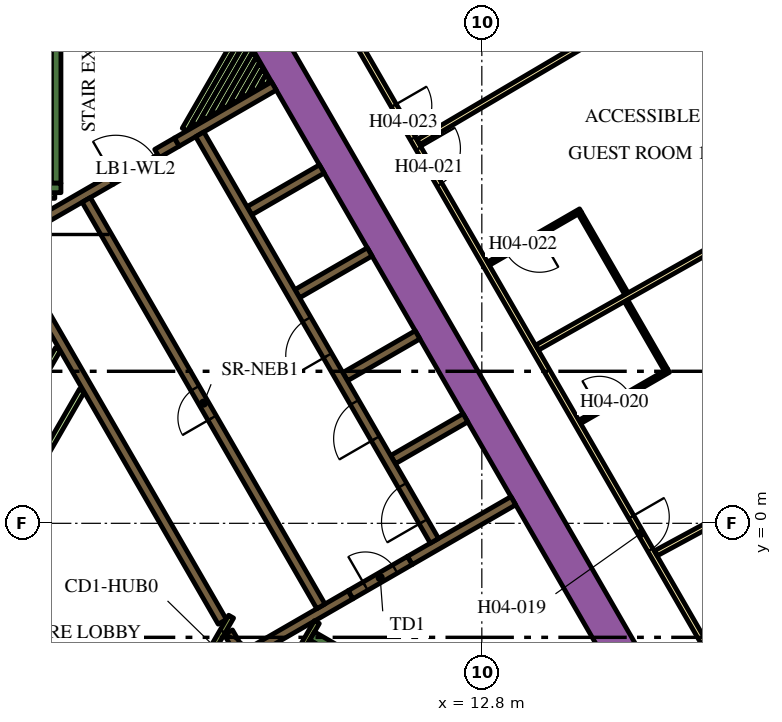
"""IFC4 building model, lengths in metres.
Left out: names, types, materials, properties, quantities, classifications, styles, units other than length and angle.
Written with IfcOpenShell. Run it as: python <this file> out.ifc"""

import sys

from ifc_helpers import new_model, si_unit, direction, frame, frame_2d, origin, place, context, subcontext, project, spatial, rectangle, extrude, element, fill, save


model = new_model("IFC4")
c1 = context("Model", 3, precision=1e-05, world=origin(), true_north=direction((0.0, 1.0)))
c2 = subcontext(c1, "Body", "Model", "MODEL_VIEW")
j1 = project(units=[si_unit("LENGTHUNIT", "METRE"), si_unit("PLANEANGLEUNIT", "RADIAN")], contexts=[c1])
p1 = place(None, origin())
s1 = spatial("IfcSite", under=j1, at=p1, CompositionType="ELEMENT")
p2 = place(p1, origin())
s2 = spatial("IfcBuilding", under=s1, at=p2, CompositionType="ELEMENT")
p3 = place(p2, frame((0.0, 0.0, 66.6)))
s3 = spatial("IfcBuildingStorey", under=s2, at=p3, CompositionType="ELEMENT", Elevation=66.6)
p4 = place(p3, frame((6.461, 13.909, 0.0), z_axis=(0.0, 0.0, 1.0), x_axis=(0.500005804227, -0.866022052686, 0.0)))
e1 = element("IfcWall", 1, at=p4, inside=s3, PredefinedType="SOLIDWALL", context=c2, shape_type="SweptSolid", body=[
    extrude(rectangle(XDim=20.834, YDim=0.9, at=frame_2d((10.417, 0.0))), origin(), (0.0, 0.0, 1.0), 3.9),
])
p5 = place(p3, frame((8.334, -2.964, 0.0), z_axis=(0.0, 0.0, 1.0), x_axis=(0.866016039709, -0.500016218704, 0.0)))
e2 = element("IfcWall", 2, at=p5, inside=s3, PredefinedType="SOLIDWALL", context=c2, shape_type="SweptSolid", body=[
    extrude(rectangle(XDim=7.05, YDim=0.25, at=frame_2d((3.525, 0.0))), origin(), (0.0, 0.0, 1.0), 3.9),
])
p6 = place(p3, frame((8.168, -3.503, 0.0), z_axis=(0.0, 0.0, 1.0), x_axis=(0.49972245349, 0.866185586049, 0.0)))
e3 = element("IfcWall", 3, at=p6, inside=s3, PredefinedType="SOLIDWALL", context=c2, shape_type="SweptSolid", body=[
    extrude(rectangle(XDim=0.425, YDim=0.25, at=frame_2d((0.212, 0.0))), origin(), (0.0, 0.0, 1.0), 3.9),
])
p7 = place(p3, frame((1.6, 8.95, 0.0), z_axis=(0.0, 0.0, 1.0), x_axis=(0.0, 1.0, 0.0)))
e4 = element("IfcWall", 4, at=p7, inside=s3, PredefinedType="SOLIDWALL", context=c2, shape_type="SweptSolid", body=[
    extrude(rectangle(XDim=6.8, YDim=0.25, at=frame_2d((3.4, 0.0))), origin(), (0.0, 0.0, 1.0), 3.9),
])
p8 = place(p3, frame((1.05, 8.825, 0.0), z_axis=(0.0, 0.0, 1.0), x_axis=(1.0, 0.0, 0.0)))
e5 = element("IfcWall", 5, at=p8, inside=s3, PredefinedType="SOLIDWALL", context=c2, shape_type="SweptSolid", body=[
    extrude(rectangle(XDim=0.675, YDim=0.25, at=frame_2d((0.337, 0.0))), origin(), (0.0, 0.0, 1.0), 3.9),
])
p9 = place(p3, frame((10.464, 1.677, 0.0), z_axis=(0.0, 0.0, 1.0), x_axis=(0.86605622881, 0.499946605688, 0.0)))
e6 = element("IfcWall", 6, at=p9, inside=s3, PredefinedType="SOLIDWALL", context=c2, shape_type="SweptSolid", body=[
    extrude(rectangle(XDim=2.2, YDim=0.25, at=frame_2d((1.1, 0.0))), origin(), (0.0, 0.0, 1.0), 3.9),
])
p10 = place(p3, frame((13.629, 0.594, 0.0), z_axis=(0.0, 0.0, 1.0), x_axis=(-0.86602790099, -0.499995674689, 0.0)))
e7 = element("IfcWall", 7, at=p10, inside=s3, PredefinedType="SOLIDWALL", context=c2, shape_type="SweptSolid", body=[
    extrude(rectangle(XDim=3.146, YDim=0.25, at=frame_2d((1.573, 0.0))), origin(), (0.0, 0.0, 1.0), 3.9),
])
p11 = place(p3, frame((9.346, -1.879, 0.0), z_axis=(0.0, 0.0, 1.0), x_axis=(-0.866048528039, -0.499959945477, 0.0)))
e8 = element("IfcWall", 8, at=p11, inside=s3, PredefinedType="SOLIDWALL", context=c2, shape_type="SweptSolid", body=[
    extrude(rectangle(XDim=3.47, YDim=0.25, at=frame_2d((1.735, 0.0))), origin(), (0.0, 0.0, 1.0), 3.9),
])
p12 = place(p3, frame((6.13, -2.867, 0.0), z_axis=(0.0, 0.0, 1.0), x_axis=(0.500160776593, -0.865932559475, 0.0)))
e9 = element("IfcWall", 9, at=p12, inside=s3, PredefinedType="SOLIDWALL", context=c2, shape_type="SweptSolid", body=[
    extrude(rectangle(XDim=0.627, YDim=0.25, at=frame_2d((0.313, 0.0))), origin(), (0.0, 0.0, 1.0), 3.9),
])
for number, where, z_axis, x_axis in (
    (10, (9.204, 3.859, 0.0), (0.0, 0.0, 1.0), (0.866, 0.5, 0.0)),
    (11, (7.944, 6.041, 0.0), (0.0, 0.0, 1.0), (0.866, 0.5, 0.0)),
    (12, (6.684, 8.224, 0.0), (0.0, 0.0, 1.0), (0.866, 0.5, 0.0)),
):
    element("IfcWall", number, at=place(p3, frame(where, z_axis=z_axis, x_axis=x_axis)), inside=s3, PredefinedType="SOLIDWALL", context=c2, shape_type="SweptSolid", body=[
        extrude(rectangle(XDim=2.2, YDim=0.25, at=frame_2d((1.1, 0.0))), origin(), (0.0, 0.0, 1.0), 3.9),
    ])
p13 = place(p3, frame((4.254, 9.731, 0.0), z_axis=(0.0, 0.0, 1.0), x_axis=(0.866056883327, 0.499945471869, 0.0)))
e13 = element("IfcWall", 13, at=p13, inside=s3, PredefinedType="SOLIDWALL", context=c2, shape_type="SweptSolid", body=[
    extrude(rectangle(XDim=0.6, YDim=0.25, at=frame_2d((0.3, 0.0))), origin(), (0.0, 0.0, 1.0), 3.9),
])
p14 = place(p3, frame((4.776, 10.032, 0.0), z_axis=(0.0, 0.0, 1.0), x_axis=(0.86600215702, 0.500040262416, 0.0)))
e14 = element("IfcWall", 14, at=p14, inside=s3, PredefinedType="SOLIDWALL", context=c2, shape_type="SweptSolid", body=[
    extrude(rectangle(XDim=2.948, YDim=0.25, at=frame_2d((1.474, 0.0))), origin(), (0.0, 0.0, 1.0), 3.9),
])
p15 = place(p3, frame((0.098, 7.331, 0.0), z_axis=(0.0, 0.0, 1.0), x_axis=(0.865988154826, 0.50006451154, 0.0)))
e15 = element("IfcWall", 15, at=p15, inside=s3, PredefinedType="SOLIDWALL", context=c2, shape_type="SweptSolid", body=[
    extrude(rectangle(XDim=3.398, YDim=0.25, at=frame_2d((1.699, 0.0))), origin(), (0.0, 0.0, 1.0), 3.9),
])
p16 = place(p3, frame((5.97, -2.591, 0.0), z_axis=(0.0, 0.0, 1.0), x_axis=(-0.499994469932, 0.866028596547, 0.0)))
e16 = element("IfcWall", 16, at=p16, inside=s3, PredefinedType="SOLIDWALL", context=c2, shape_type="SweptSolid", body=[
    extrude(rectangle(XDim=10.488, YDim=0.25, at=frame_2d((5.244, 0.0))), origin(), (0.0, 0.0, 1.0), 3.9),
])
p17 = place(p3, frame((8.459, -2.599, 0.0), z_axis=(0.0, 0.0, 1.0), x_axis=(-0.500041054325, -0.866001699761, 0.0)))
e17 = element("IfcWall", 17, at=p17, inside=s3, PredefinedType="PARTITIONING", context=c2, shape_type="SweptSolid", body=[
    extrude(rectangle(XDim=0.929, YDim=0.15, at=frame_2d((0.464, 0.0))), origin(), (0.0, 0.0, 1.0), 3.9),
])
p18 = place(p3, frame((-1.887, -3.718, 0.0), z_axis=(0.0, 0.0, 1.0), x_axis=(0.500005008002, 0.866022512394, 0.0)))
e18 = element("IfcWall", 18, at=p18, inside=s3, PredefinedType="PARTITIONING", context=c2, shape_type="SweptSolid", body=[
    extrude(rectangle(XDim=8.327, YDim=0.15, at=frame_2d((4.164, 0.0))), origin(), (0.0, 0.0, 1.0), 2.75),
])
p19 = place(p3, frame((-0.3, 1.212, 0.0), z_axis=(0.0, 0.0, 1.0), x_axis=(0.499963101113, 0.866046706318, 0.0)))
e19 = element("IfcWall", 19, at=p19, inside=s3, PredefinedType="PARTITIONING", context=c2, shape_type="SweptSolid", body=[
    extrude(rectangle(XDim=3.893, YDim=0.15, at=frame_2d((1.947, 0.0))), origin(), (0.0, 0.0, 1.0), 2.75),
])
p20 = place(p3, frame((1.05, 8.625, 0.0), z_axis=(0.0, 0.0, 1.0), x_axis=(1.0, 0.0, 0.0)))
e20 = element("IfcWall", 20, at=p20, inside=s3, PredefinedType="PARTITIONING", context=c2, shape_type="SweptSolid", body=[
    extrude(rectangle(XDim=0.514, YDim=0.15, at=frame_2d((0.257, 0.0))), origin(), (0.0, 0.0, 1.0), 2.75),
])
p21 = place(p3, frame((4.982, 10.359, 0.0), z_axis=(0.0, 0.0, 1.0), x_axis=(0.500051824031, 0.865995481099, 0.0)))
e21 = element("IfcWall", 21, at=p21, inside=s3, PredefinedType="PARTITIONING", context=c2, shape_type="SweptSolid", body=[
    extrude(rectangle(XDim=2.973, YDim=0.15, at=frame_2d((1.486, 0.0))), origin(), (0.0, 0.0, 1.0), 2.75),
])
p22 = place(p3, frame((5.242, 10.509, 0.0), z_axis=(0.0, 0.0, 1.0), x_axis=(0.499958506883, 0.866049358521, 0.0)))
e22 = element("IfcWall", 22, at=p22, inside=s3, PredefinedType="PARTITIONING", context=c2, shape_type="SweptSolid", body=[
    extrude(rectangle(XDim=2.626, YDim=0.15, at=frame_2d((1.313, 0.0))), origin(), (0.0, 0.0, 1.0), 2.75),
])
p23 = place(p3, frame((5.501, 10.659, 0.0), z_axis=(0.0, 0.0, 1.0), x_axis=(0.499951092774, 0.866053638543, 0.0)))
e23 = element("IfcWall", 23, at=p23, inside=s3, PredefinedType="PARTITIONING", context=c2, shape_type="SweptSolid", body=[
    extrude(rectangle(XDim=2.28, YDim=0.15, at=frame_2d((1.14, 0.0))), origin(), (0.0, 0.0, 1.0), 2.75),
])
p24 = place(p3, frame((5.761, 10.809, 0.0), z_axis=(0.0, 0.0, 1.0), x_axis=(0.499900985997, 0.866082561999, 0.0)))
e24 = element("IfcWall", 24, at=p24, inside=s3, PredefinedType="PARTITIONING", context=c2, shape_type="SweptSolid", body=[
    extrude(rectangle(XDim=1.934, YDim=0.15, at=frame_2d((0.967, 0.0))), origin(), (0.0, 0.0, 1.0), 2.75),
])
p25 = place(p3, frame((6.021, 10.959, 0.0), z_axis=(0.0, 0.0, 1.0), x_axis=(0.499944387978, 0.86605750902, 0.0)))
e25 = element("IfcWall", 25, at=p25, inside=s3, PredefinedType="PARTITIONING", context=c2, shape_type="SweptSolid", body=[
    extrude(rectangle(XDim=1.587, YDim=0.15, at=frame_2d((0.793, 0.0))), origin(), (0.0, 0.0, 1.0), 2.75),
])
p26 = place(p3, frame((6.281, 11.109, 0.0), z_axis=(0.0, 0.0, 1.0), x_axis=(0.500012022864, 0.866018462269, 0.0)))
e26 = element("IfcWall", 26, at=p26, inside=s3, PredefinedType="PARTITIONING", context=c2, shape_type="SweptSolid", body=[
    extrude(rectangle(XDim=1.241, YDim=0.15, at=frame_2d((0.62, 0.0))), origin(), (0.0, 0.0, 1.0), 2.75),
])
p27 = place(p3, frame((6.541, 11.259, 0.0), z_axis=(0.0, 0.0, 1.0), x_axis=(0.500132045864, 0.865949153646, 0.0)))
e27 = element("IfcWall", 27, at=p27, inside=s3, PredefinedType="PARTITIONING", context=c2, shape_type="SweptSolid", body=[
    extrude(rectangle(XDim=0.894, YDim=0.15, at=frame_2d((0.447, 0.0))), origin(), (0.0, 0.0, 1.0), 2.75),
])
p28 = place(p3, frame((6.8, 11.409, 0.0), z_axis=(0.0, 0.0, 1.0), x_axis=(0.500210807569, 0.865903659763, 0.0)))
e28 = element("IfcWall", 28, at=p28, inside=s3, PredefinedType="PARTITIONING", context=c2, shape_type="SweptSolid", body=[
    extrude(rectangle(XDim=0.548, YDim=0.15, at=frame_2d((0.274, 0.0))), origin(), (0.0, 0.0, 1.0), 2.75),
])
p29 = place(p3, frame((7.06, 11.559, 0.0), z_axis=(0.0, 0.0, 1.0), x_axis=(0.499267785915, 0.866447735266, 0.0)))
e29 = element("IfcWall", 29, at=p29, inside=s3, PredefinedType="PARTITIONING", context=c2, shape_type="SweptSolid", body=[
    extrude(rectangle(XDim=0.201, YDim=0.15, at=frame_2d((0.101, 0.0))), origin(), (0.0, 0.0, 1.0), 2.75),
])
p30 = place(p3, frame((11.553, -0.46, 0.0), z_axis=(0.0, 0.0, 1.0), x_axis=(-0.500006514828, 0.866021642414, 0.0)))
e30 = element("IfcWall", 30, at=p30, inside=s3, PredefinedType="SOLIDWALL", context=c2, shape_type="SweptSolid", body=[
    extrude(rectangle(XDim=12.35, YDim=0.25, at=frame_2d((6.175, 0.0))), origin(), (0.0, 0.0, 1.0), 3.9),
])
p31 = place(p30, frame((0.585, 0.0, 0.0)))
e31 = element("IfcOpeningElement", 31, at=p31, cuts=e30, PredefinedType="OPENING", context=c2, shape_type="SweptSolid", body=[
    extrude(rectangle(XDim=1.1, YDim=2.1, at=frame_2d((0.55, 1.05))), frame((0.0, 0.135, 0.0), z_axis=(0.0, -1.0, 0.0), x_axis=(1.0, 0.0, 0.0)), (0.0, 0.0, 1.0), 0.27),
])
p32 = place(p30, frame((3.105, 0.0, 0.0)))
e32 = element("IfcOpeningElement", 32, at=p32, cuts=e30, PredefinedType="OPENING", context=c2, shape_type="SweptSolid", body=[
    extrude(rectangle(XDim=1.1, YDim=2.1, at=frame_2d((0.55, 1.05))), frame((0.0, 0.135, 0.0), z_axis=(0.0, -1.0, 0.0), x_axis=(1.0, 0.0, 0.0)), (0.0, 0.0, 1.0), 0.27),
])
p33 = place(p30, frame((5.625, 0.0, 0.0)))
e33 = element("IfcOpeningElement", 33, at=p33, cuts=e30, PredefinedType="OPENING", context=c2, shape_type="SweptSolid", body=[
    extrude(rectangle(XDim=1.1, YDim=2.1, at=frame_2d((0.55, 1.05))), frame((0.0, 0.135, 0.0), z_axis=(0.0, -1.0, 0.0), x_axis=(1.0, 0.0, 0.0)), (0.0, 0.0, 1.0), 0.27),
])
p34 = place(p3, frame((8.565, -2.185, 0.0), z_axis=(0.0, 0.0, 1.0), x_axis=(-0.499997954832, 0.866026584559, 0.0)))
e34 = element("IfcWall", 34, at=p34, inside=s3, PredefinedType="SOLIDWALL", context=c2, shape_type="SweptSolid", body=[
    extrude(rectangle(XDim=12.35, YDim=0.25, at=frame_2d((6.175, 0.0))), origin(), (0.0, 0.0, 1.0), 3.9),
])
p35 = place(p34, frame((5.725, 0.0, 0.0)))
e35 = element("IfcOpeningElement", 35, at=p35, cuts=e34, PredefinedType="OPENING", context=c2, shape_type="SweptSolid", body=[
    extrude(rectangle(XDim=0.9, YDim=2.1, at=frame_2d((0.45, 1.05))), frame((0.0, 0.135, 0.0), z_axis=(0.0, -1.0, 0.0), x_axis=(1.0, 0.0, 0.0)), (0.0, 0.0, 1.0), 0.27),
])
p36 = place(p3, frame((9.346, -1.879, 0.0), z_axis=(0.0, 0.0, 1.0), x_axis=(0.866047807691, 0.499961193289, 0.0)))
e36 = element("IfcWall", 36, at=p36, inside=s3, PredefinedType="SOLIDWALL", context=c2, shape_type="SweptSolid", body=[
    extrude(rectangle(XDim=1.8, YDim=0.25, at=frame_2d((0.9, 0.0))), origin(), (0.0, 0.0, 1.0), 3.9),
])
p37 = place(p36, frame((0.45, 0.0, 0.0)))
e37 = element("IfcOpeningElement", 37, at=p37, cuts=e36, PredefinedType="OPENING", context=c2, shape_type="SweptSolid", body=[
    extrude(rectangle(XDim=0.9, YDim=2.1, at=frame_2d((0.45, 1.05))), frame((0.0, 0.135, 0.0), z_axis=(0.0, -1.0, 0.0), x_axis=(1.0, 0.0, 0.0)), (0.0, 0.0, 1.0), 0.27),
])
p38 = place(p3, frame((6.203, -2.456, 0.0), z_axis=(0.0, 0.0, 1.0), x_axis=(-0.500043961785, -0.866000020948, 0.0)))
e38 = element("IfcWall", 38, at=p38, inside=s3, PredefinedType="PARTITIONING", context=c2, shape_type="SweptSolid", body=[
    extrude(rectangle(XDim=1.95, YDim=0.15, at=frame_2d((0.975, 0.0))), origin(), (0.0, 0.0, 1.0), 3.9),
])
p39 = place(p38, frame((0.45, 0.0, 0.0)))
e39 = element("IfcOpeningElement", 39, at=p39, cuts=e38, PredefinedType="OPENING", context=c2, shape_type="SweptSolid", body=[
    extrude(rectangle(XDim=0.9, YDim=2.1, at=frame_2d((0.45, 1.05))), frame((0.0, 0.085, 0.0), z_axis=(0.0, -1.0, 0.0), x_axis=(1.0, 0.0, 0.0)), (0.0, 0.0, 1.0), 0.17),
])
p40 = place(p3, frame((3.081, 8.961, 0.0), z_axis=(0.0, 0.0, 1.0), x_axis=(0.866034573852, 0.49998411664, 0.0)))
e40 = element("IfcWall", 40, at=p40, inside=s3, PredefinedType="PARTITIONING", context=c2, shape_type="SweptSolid", body=[
    extrude(rectangle(XDim=1.4, YDim=0.09, at=frame_2d((0.7, 0.0))), origin(), (0.0, 0.0, 1.0), 2.75),
])
p41 = place(p40, frame((0.1, 0.0, 0.0)))
e41 = element("IfcOpeningElement", 41, at=p41, cuts=e40, PredefinedType="OPENING", context=c2, shape_type="SweptSolid", body=[
    extrude(rectangle(XDim=1.2, YDim=2.1, at=frame_2d((0.6, 1.05))), frame((0.0, 0.055, 0.0), z_axis=(0.0, -1.0, 0.0), x_axis=(1.0, 0.0, 0.0)), (0.0, 0.0, 1.0), 0.11),
])
p42 = place(p3, frame((6.163, 18.475, 0.0), z_axis=(0.0, 0.0, 1.0), x_axis=(0.500001317485, -0.866024643133, 0.0)))
e42 = element("IfcWall", 42, at=p42, inside=s3, PredefinedType="PARTITIONING", context=c2, shape_type="SweptSolid", body=[
    extrude(rectangle(XDim=25.767, YDim=0.15, at=frame_2d((12.883, 0.0))), origin(), (0.0, 0.0, 1.0), 2.75),
])
p43 = place(p42, frame((21.138, 0.0, 0.0)))
e43 = element("IfcOpeningElement", 43, at=p43, cuts=e42, PredefinedType="OPENING", context=c2, shape_type="SweptSolid", body=[
    extrude(rectangle(XDim=1.0, YDim=2.1, at=frame_2d((0.5, 1.05))), frame((0.0, 0.085, 0.0), z_axis=(0.0, -1.0, 0.0), x_axis=(1.0, 0.0, 0.0)), (0.0, 0.0, 1.0), 0.17),
])
p44 = place(p42, frame((9.948, 0.0, 0.0)))
e44 = element("IfcOpeningElement", 44, at=p44, cuts=e42, PredefinedType="OPENING", context=c2, shape_type="SweptSolid", body=[
    extrude(rectangle(XDim=1.1, YDim=2.1, at=frame_2d((0.55, 1.05))), frame((0.0, 0.085, 0.0), z_axis=(0.0, -1.0, 0.0), x_axis=(1.0, 0.0, 0.0)), (0.0, 0.0, 1.0), 0.17),
])
p45 = place(p42, frame((8.641, 0.0, 0.0)))
e45 = element("IfcOpeningElement", 45, at=p45, cuts=e42, PredefinedType="OPENING", context=c2, shape_type="SweptSolid", body=[
    extrude(rectangle(XDim=1.0, YDim=2.1, at=frame_2d((0.5, 1.05))), frame((0.0, 0.085, 0.0), z_axis=(0.0, -1.0, 0.0), x_axis=(1.0, 0.0, 0.0)), (0.0, 0.0, 1.0), 0.17),
])
p46 = place(p42, frame((0.18, 0.0, 0.0)))
e46 = element("IfcOpeningElement", 46, at=p46, cuts=e42, PredefinedType="OPENING", context=c2, shape_type="SweptSolid", body=[
    extrude(rectangle(XDim=1.0, YDim=2.1, at=frame_2d((0.5, 1.05))), frame((0.0, 0.085, 0.0), z_axis=(0.0, -1.0, 0.0), x_axis=(1.0, 0.0, 0.0)), (0.0, 0.0, 1.0), 0.17),
])
p47 = place(p3, frame((17.856, 13.999, 0.0), z_axis=(0.0, 0.0, 1.0), x_axis=(-0.861371519381, -0.507975497047, 0.0)))
e47 = element("IfcWall", 47, at=p47, inside=s3, PredefinedType="PARTITIONING", context=c2, shape_type="SweptSolid", body=[
    extrude(rectangle(XDim=7.804, YDim=0.15, at=frame_2d((3.902, 0.0))), origin(), (0.0, 0.0, 1.0), 2.75),
])
p48 = place(p3, frame((21.052, 8.464, 0.0), z_axis=(0.0, 0.0, 1.0), x_axis=(-0.87059371954, -0.492002617368, 0.0)))
e48 = element("IfcWall", 48, at=p48, inside=s3, PredefinedType="PARTITIONING", context=c2, shape_type="SweptSolid", body=[
    extrude(rectangle(XDim=7.803, YDim=0.15, at=frame_2d((3.902, 0.0))), origin(), (0.0, 0.0, 1.0), 2.75),
])
p49 = place(p3, frame((24.145, 2.871, 0.0), z_axis=(0.0, 0.0, 1.0), x_axis=(-0.879551725039, -0.475803281809, 0.0)))
e49 = element("IfcWall", 49, at=p49, inside=s3, PredefinedType="PARTITIONING", context=c2, shape_type="SweptSolid", body=[
    extrude(rectangle(XDim=7.688, YDim=0.15, at=frame_2d((3.844, 0.0))), origin(), (0.0, 0.0, 1.0), 2.75),
])
p50 = place(p3, frame((15.376, 2.668, 0.0), z_axis=(0.0, 0.0, 1.0), x_axis=(0.866036505625, 0.499980770555, 0.0)))
e50 = element("IfcWall", 50, at=p50, inside=s3, PredefinedType="PARTITIONING", context=c2, shape_type="SweptSolid", body=[
    extrude(rectangle(XDim=2.7, YDim=0.1, at=frame_2d((1.35, 0.0))), origin(), (0.0, 0.0, 1.0), 2.75),
])
p51 = place(p50, frame((0.6, 0.0, 0.0)))
e51 = element("IfcOpeningElement", 51, at=p51, cuts=e50, PredefinedType="OPENING", context=c2, shape_type="SweptSolid", body=[
    extrude(rectangle(XDim=0.9, YDim=2.1, at=frame_2d((0.45, 1.05))), frame((0.0, 0.06, 0.0), z_axis=(0.0, -1.0, 0.0), x_axis=(1.0, 0.0, 0.0)), (0.0, 0.0, 1.0), 0.12),
])
p52 = place(p3, frame((17.646, 4.036, 0.0), z_axis=(0.0, 0.0, 1.0), x_axis=(-0.500027713859, 0.866009402589, 0.0)))
e52 = element("IfcWall", 52, at=p52, inside=s3, PredefinedType="PARTITIONING", context=c2, shape_type="SweptSolid", body=[
    extrude(rectangle(XDim=2.1, YDim=0.1, at=frame_2d((1.05, 0.0))), origin(), (0.0, 0.0, 1.0), 2.75),
])
p53 = place(p3, frame((15.397, 8.231, 0.0), z_axis=(0.0, 0.0, 1.0), x_axis=(-0.866018616679, -0.500011755427, 0.0)))
e53 = element("IfcWall", 53, at=p53, inside=s3, PredefinedType="PARTITIONING", context=c2, shape_type="SweptSolid", body=[
    extrude(rectangle(XDim=2.8, YDim=0.1, at=frame_2d((1.4, 0.0))), origin(), (0.0, 0.0, 1.0), 2.75),
])
p54 = place(p53, frame((1.25, 0.0, 0.0)))
e54 = element("IfcOpeningElement", 54, at=p54, cuts=e53, PredefinedType="OPENING", context=c2, shape_type="SweptSolid", body=[
    extrude(rectangle(XDim=1.0, YDim=2.1, at=frame_2d((0.5, 1.05))), frame((0.0, 0.06, 0.0), z_axis=(0.0, -1.0, 0.0), x_axis=(1.0, 0.0, 0.0)), (0.0, 0.0, 1.0), 0.12),
])
p55 = place(p3, frame((15.379, 8.163, 0.0), z_axis=(0.0, 0.0, 1.0), x_axis=(0.499987006516, -0.866032905446, 0.0)))
e55 = element("IfcWall", 55, at=p55, inside=s3, PredefinedType="PARTITIONING", context=c2, shape_type="SweptSolid", body=[
    extrude(rectangle(XDim=2.45, YDim=0.1, at=frame_2d((1.225, 0.0))), origin(), (0.0, 0.0, 1.0), 2.75),
])
p56 = place(p31, origin())
e56 = element("IfcDoor", 56, at=p56, inside=s3, OperationType="DOUBLE_DOOR_SLIDING", PredefinedType="DOOR", context=c2, shape_type="SweptSolid", body=[
    extrude(rectangle(XDim=1.1, YDim=2.1, at=frame_2d((0.55, 1.05))), frame((0.0, 0.025, 0.0), z_axis=(0.0, -1.0, 0.0), x_axis=(1.0, 0.0, 0.0)), (0.0, 0.0, 1.0), 0.05),
])
fill(e31, e56)
p57 = place(p32, origin())
e57 = element("IfcDoor", 57, at=p57, inside=s3, OperationType="DOUBLE_DOOR_SLIDING", PredefinedType="DOOR", context=c2, shape_type="SweptSolid", body=[
    extrude(rectangle(XDim=1.1, YDim=2.1, at=frame_2d((0.55, 1.05))), frame((0.0, 0.025, 0.0), z_axis=(0.0, -1.0, 0.0), x_axis=(1.0, 0.0, 0.0)), (0.0, 0.0, 1.0), 0.05),
])
fill(e32, e57)
p58 = place(p33, origin())
e58 = element("IfcDoor", 58, at=p58, inside=s3, OperationType="DOUBLE_DOOR_SLIDING", PredefinedType="DOOR", context=c2, shape_type="SweptSolid", body=[
    extrude(rectangle(XDim=1.1, YDim=2.1, at=frame_2d((0.55, 1.05))), frame((0.0, 0.025, 0.0), z_axis=(0.0, -1.0, 0.0), x_axis=(1.0, 0.0, 0.0)), (0.0, 0.0, 1.0), 0.05),
])
fill(e33, e58)
p59 = place(p35, origin())
e59 = element("IfcDoor", 59, at=p59, inside=s3, OperationType="SINGLE_SWING_LEFT", PredefinedType="DOOR", context=c2, shape_type="SweptSolid", body=[
    extrude(rectangle(XDim=0.9, YDim=2.1, at=frame_2d((0.45, 1.05))), frame((0.0, 0.025, 0.0), z_axis=(0.0, -1.0, 0.0), x_axis=(1.0, 0.0, 0.0)), (0.0, 0.0, 1.0), 0.05),
])
fill(e35, e59)
p60 = place(p37, origin())
e60 = element("IfcDoor", 60, at=p60, inside=s3, OperationType="SINGLE_SWING_LEFT", PredefinedType="DOOR", context=c2, shape_type="SweptSolid", body=[
    extrude(rectangle(XDim=0.9, YDim=2.1, at=frame_2d((0.45, 1.05))), frame((0.0, 0.025, 0.0), z_axis=(0.0, -1.0, 0.0), x_axis=(1.0, 0.0, 0.0)), (0.0, 0.0, 1.0), 0.05),
])
fill(e37, e60)
p61 = place(p39, origin())
e61 = element("IfcDoor", 61, at=p61, inside=s3, OperationType="SINGLE_SWING_LEFT", PredefinedType="DOOR", context=c2, shape_type="SweptSolid", body=[
    extrude(rectangle(XDim=0.9, YDim=2.1, at=frame_2d((0.45, 1.05))), frame((0.0, 0.025, 0.0), z_axis=(0.0, -1.0, 0.0), x_axis=(1.0, 0.0, 0.0)), (0.0, 0.0, 1.0), 0.05),
])
fill(e39, e61)
p62 = place(p41, origin())
e62 = element("IfcDoor", 62, at=p62, inside=s3, OperationType="SINGLE_SWING_LEFT", PredefinedType="DOOR", context=c2, shape_type="SweptSolid", body=[
    extrude(rectangle(XDim=1.2, YDim=2.1, at=frame_2d((0.6, 1.05))), frame((0.0, 0.025, 0.0), z_axis=(0.0, -1.0, 0.0), x_axis=(1.0, 0.0, 0.0)), (0.0, 0.0, 1.0), 0.05),
])
fill(e41, e62)
p63 = place(p43, origin())
e63 = element("IfcDoor", 63, at=p63, inside=s3, OperationType="SINGLE_SWING_RIGHT", PredefinedType="DOOR", context=c2, shape_type="SweptSolid", body=[
    extrude(rectangle(XDim=1.0, YDim=2.1, at=frame_2d((0.5, 1.05))), frame((0.0, 0.025, 0.0), z_axis=(0.0, -1.0, 0.0), x_axis=(1.0, 0.0, 0.0)), (0.0, 0.0, 1.0), 0.05),
])
fill(e43, e63)
p64 = place(p51, origin())
e64 = element("IfcDoor", 64, at=p64, inside=s3, OperationType="SINGLE_SWING_LEFT", PredefinedType="DOOR", context=c2, shape_type="SweptSolid", body=[
    extrude(rectangle(XDim=0.9, YDim=2.1, at=frame_2d((0.45, 1.05))), frame((0.0, 0.025, 0.0), z_axis=(0.0, -1.0, 0.0), x_axis=(1.0, 0.0, 0.0)), (0.0, 0.0, 1.0), 0.05),
])
fill(e51, e64)
p65 = place(p44, origin())
e65 = element("IfcDoor", 65, at=p65, inside=s3, OperationType="SINGLE_SWING_LEFT", PredefinedType="DOOR", context=c2, shape_type="SweptSolid", body=[
    extrude(rectangle(XDim=1.1, YDim=2.1, at=frame_2d((0.55, 1.05))), frame((0.0, 0.025, 0.0), z_axis=(0.0, -1.0, 0.0), x_axis=(1.0, 0.0, 0.0)), (0.0, 0.0, 1.0), 0.05),
])
fill(e44, e65)
p66 = place(p54, origin())
e66 = element("IfcDoor", 66, at=p66, inside=s3, OperationType="SINGLE_SWING_LEFT", PredefinedType="DOOR", context=c2, shape_type="SweptSolid", body=[
    extrude(rectangle(XDim=1.0, YDim=2.1, at=frame_2d((0.5, 1.05))), frame((0.0, 0.025, 0.0), z_axis=(0.0, -1.0, 0.0), x_axis=(1.0, 0.0, 0.0)), (0.0, 0.0, 1.0), 0.05),
])
fill(e54, e66)
p67 = place(p45, origin())
e67 = element("IfcDoor", 67, at=p67, inside=s3, OperationType="SINGLE_SWING_RIGHT", PredefinedType="DOOR", context=c2, shape_type="SweptSolid", body=[
    extrude(rectangle(XDim=1.0, YDim=2.1, at=frame_2d((0.5, 1.05))), frame((0.0, 0.025, 0.0), z_axis=(0.0, -1.0, 0.0), x_axis=(1.0, 0.0, 0.0)), (0.0, 0.0, 1.0), 0.05),
])
fill(e45, e67)
save(model, sys.argv[1])
